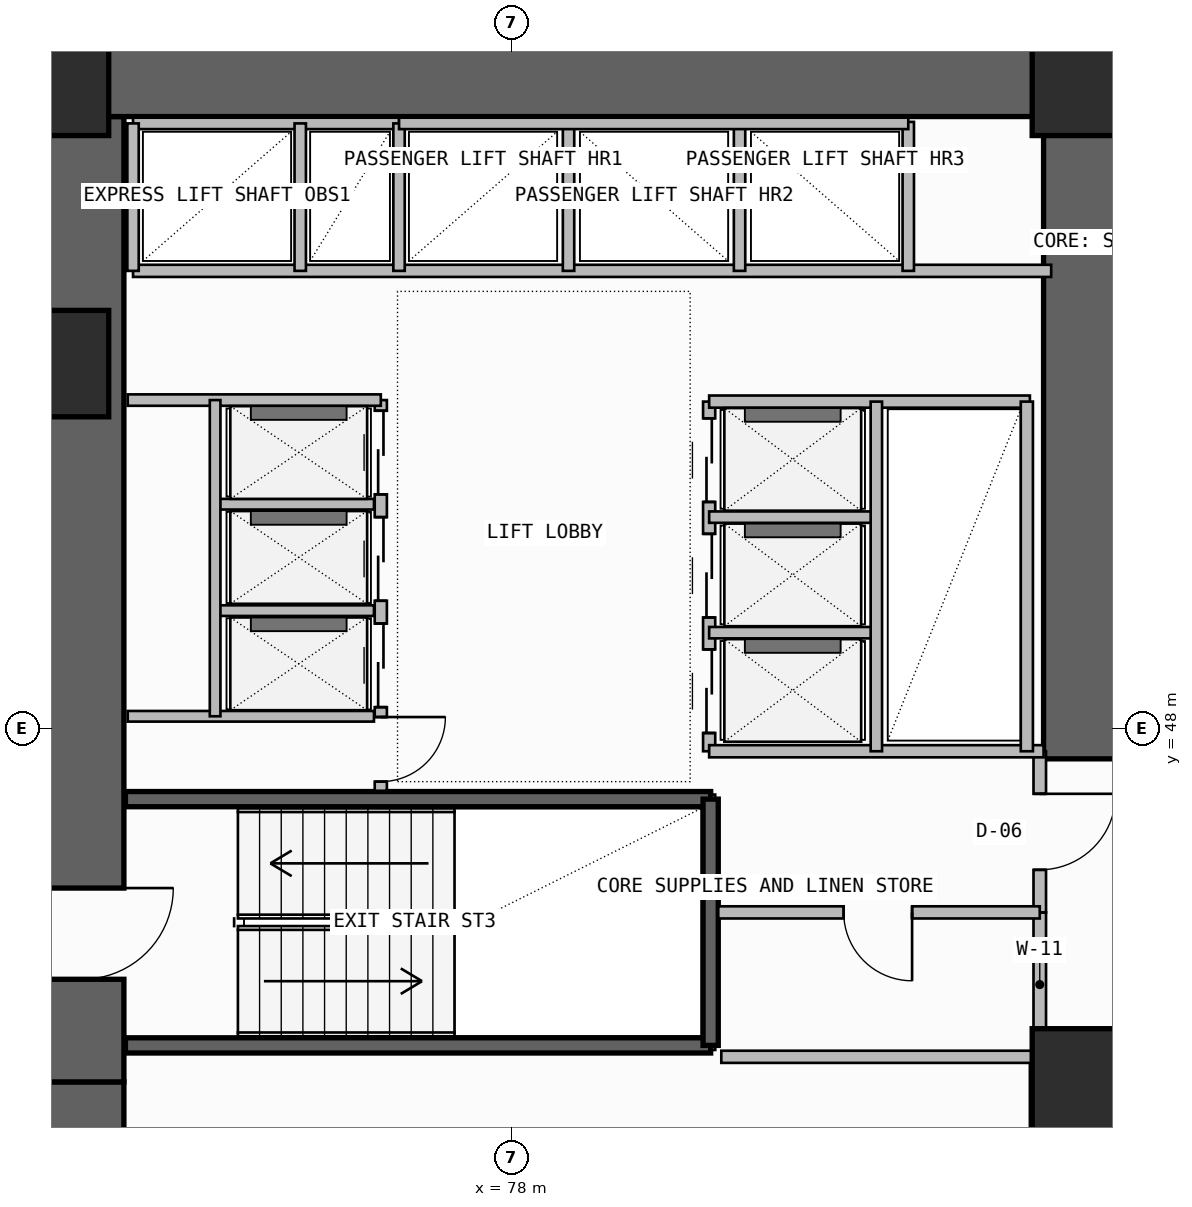
"""IFC4 building model, lengths in metres.
Left out: names, types, materials, properties, quantities, classifications, styles, units other than length and angle.
Written with IfcOpenShell. Run it as: python <this file> out.ifc"""

import sys

from ifc_helpers import new_model, si_unit, direction, frame, frame_2d, origin, origin_2d, place, context, subcontext, project, spatial, rectangle, extrude, element, fill, save


model = new_model("IFC4")
c1 = context("Model", 3, precision=1e-05, world=origin(), true_north=direction((0.0, 1.0)))
c2 = subcontext(c1, "Body", "Model", "MODEL_VIEW")
j1 = project(units=[si_unit("LENGTHUNIT", "METRE"), si_unit("PLANEANGLEUNIT", "RADIAN")], contexts=[c1])
p1 = place(None, origin())
s1 = spatial("IfcSite", under=j1, at=p1, CompositionType="ELEMENT")
p2 = place(p1, origin())
s2 = spatial("IfcBuilding", under=s1, at=p2, CompositionType="ELEMENT")
p3 = place(p2, frame((0.0, 0.0, 92.1)))
s3 = spatial("IfcBuildingStorey", under=s2, at=p3, CompositionType="ELEMENT", Elevation=92.1)
p4 = place(p3, frame((72.35, 35.5, -0.26), z_axis=(0.0, 0.0, 1.0), x_axis=(0.0, 1.0, 0.0)))
e1 = element("IfcWall", 1, at=p4, inside=s3, PredefinedType="SHEAR", context=c2, shape_type="SweptSolid", body=[
    extrude(rectangle(XDim=7.85, YDim=1.1, at=frame_2d((3.925, 0.0))), origin(), (0.0, 0.0, 1.0), 3.46),
])
p5 = place(p4, frame((1.45, 0.0, 0.26)))
e2 = element("IfcOpeningElement", 2, at=p5, cuts=e1, PredefinedType="OPENING", context=c2, shape_type="SweptSolid", body=[
    extrude(rectangle(XDim=1.2, YDim=2.2, at=frame_2d((0.6, 1.1))), frame((0.0, 0.56, 0.0), z_axis=(0.0, -1.0, 0.0), x_axis=(1.0, 0.0, 0.0)), (0.0, 0.0, 1.0), 1.12),
])
p6 = place(p3, frame((72.35, 43.35, -0.26), z_axis=(0.0, 0.0, 1.0), x_axis=(0.0, 1.0, 0.0)))
e3 = element("IfcWall", 3, at=p6, inside=s3, PredefinedType="SHEAR", context=c2, shape_type="SweptSolid", body=[
    extrude(rectangle(XDim=12.7, YDim=1.1, at=frame_2d((6.35, 0.0))), origin(), (0.0, 0.0, 1.0), 3.46),
])
p7 = place(p6, frame((1.35, 0.0, 0.26)))
e4 = element("IfcOpeningElement", 4, at=p7, cuts=e3, PredefinedType="OPENING", context=c2, shape_type="SweptSolid", body=[
    extrude(rectangle(XDim=1.2, YDim=2.2, at=frame_2d((0.6, 1.1))), frame((0.0, 0.56, 0.0), z_axis=(0.0, -1.0, 0.0), x_axis=(1.0, 0.0, 0.0)), (0.0, 0.0, 1.0), 1.12),
])
p8 = place(p3, frame((71.8, 56.6, -0.26), z_axis=(0.0, 0.0, 1.0), x_axis=(1.0, 0.0, 0.0)))
e5 = element("IfcWall", 5, at=p8, inside=s3, PredefinedType="SHEAR", context=c2, shape_type="SweptSolid", body=[
    extrude(rectangle(XDim=14.3, YDim=1.1, at=frame_2d((7.15, 0.0))), origin(), (0.0, 0.0, 1.0), 3.46),
])
p9 = place(p3, frame((85.55, 47.6, -0.26), z_axis=(0.0, 0.0, 1.0), x_axis=(0.0, 1.0, 0.0)))
e6 = element("IfcWall", 6, at=p9, inside=s3, PredefinedType="SHEAR", context=c2, shape_type="SweptSolid", body=[
    extrude(rectangle(XDim=8.45, YDim=1.1, at=frame_2d((4.225, 0.0))), origin(), (0.0, 0.0, 1.0), 3.46),
])
for number, where, z_axis, x_axis in (
    (7, (85.55, 43.35, 0.0), (0.0, 0.0, 1.0), (1.0, 0.0, 0.0)),
    (8, (72.0, 52.8, 0.0), (0.0, 0.0, 1.0), (1.0, 0.0, 0.0)),
    (9, (72.0, 56.5, 0.0), (0.0, 0.0, 1.0), (1.0, 0.0, 0.0)),
    (10, (85.55, 56.5, 0.0), (0.0, 0.0, 1.0), (1.0, 0.0, 0.0)),
):
    element("IfcColumn", number, at=place(p3, frame(where, z_axis=z_axis, x_axis=x_axis)), inside=s3, PredefinedType="COLUMN", context=c2, shape_type="SweptSolid", body=[
        extrude(rectangle(XDim=1.4, YDim=1.4, at=origin_2d()), origin(), (0.0, 0.0, 1.0), 3.6),
    ])
p10 = place(p3, frame((84.92, 38.85, 0.0), z_axis=(0.0, 0.0, 1.0), x_axis=(0.0, 1.0, 0.0)))
e11 = element("IfcWall", 11, at=p10, inside=s3, PredefinedType="SOLIDWALL", context=c2, shape_type="SweptSolid", body=[
    extrude(rectangle(XDim=4.83, YDim=0.2, at=frame_2d((2.415, 0.0))), origin(), (0.0, 0.0, 1.0), 3.2),
])
p11 = place(p10, frame((1.25, 0.0, 0.0)))
e12 = element("IfcOpeningElement", 12, at=p11, cuts=e11, PredefinedType="OPENING", context=c2, shape_type="SweptSolid", body=[
    extrude(rectangle(XDim=1.1, YDim=2.2, at=frame_2d((0.55, 1.1))), frame((0.0, 0.11, 0.0), z_axis=(0.0, -1.0, 0.0), x_axis=(1.0, 0.0, 0.0)), (0.0, 0.0, 1.0), 0.22),
])
for number, where, z_axis, x_axis in (
    (13, (72.92, 43.83, -0.26), (0.0, 0.0, 1.0), (1.0, 0.0, 0.0)),
    (14, (72.92, 47.07, -0.26), (0.0, 0.0, 1.0), (1.0, 0.0, 0.0)),
):
    element("IfcWall", number, at=place(p3, frame(where, z_axis=z_axis, x_axis=x_axis)), inside=s3, PredefinedType="SOLIDWALL", context=c2, shape_type="SweptSolid", body=[
        extrude(rectangle(XDim=7.7, YDim=0.2, at=frame_2d((3.85, 0.0))), origin(), (0.0, 0.0, 1.0), 3.46),
    ])
p12 = place(p3, frame((80.62, 43.83, -0.26), z_axis=(0.0, 0.0, 1.0), x_axis=(0.0, 1.0, 0.0)))
e15 = element("IfcWall", 15, at=p12, inside=s3, PredefinedType="SOLIDWALL", context=c2, shape_type="SweptSolid", body=[
    extrude(rectangle(XDim=3.24, YDim=0.2, at=frame_2d((1.62, 0.0))), origin(), (0.0, 0.0, 1.0), 3.46),
])
p13 = place(p3, frame((84.95, 43.68, 0.0), z_axis=(0.0, 0.0, 1.0), x_axis=(0.0, 1.0, 0.0)))
e16 = element("IfcWall", 16, at=p13, inside=s3, PredefinedType="PLUMBINGWALL", context=c2, shape_type="SweptSolid", body=[
    extrude(rectangle(XDim=1.9, YDim=0.165, at=frame_2d((0.95, 0.0))), origin(), (0.0, 0.0, 1.0), 3.2),
])
p14 = place(p3, frame((84.95, 45.58, 0.0), z_axis=(0.0, 0.0, 1.0), x_axis=(0.0, 1.0, 0.0)))
e17 = element("IfcWall", 17, at=p14, inside=s3, PredefinedType="PARTITIONING", context=c2, shape_type="SweptSolid", body=[
    extrude(rectangle(XDim=2.12, YDim=0.165, at=frame_2d((1.06, 0.0))), origin(), (0.0, 0.0, 1.0), 3.2),
])
p15 = place(p14, frame((0.56, 0.0, 0.0)))
e18 = element("IfcOpeningElement", 18, at=p15, cuts=e17, PredefinedType="OPENING", context=c2, shape_type="SweptSolid", body=[
    extrude(rectangle(XDim=1.0, YDim=2.2, at=frame_2d((0.5, 1.1))), frame((0.0, 0.093, 0.0), z_axis=(0.0, -1.0, 0.0), x_axis=(1.0, 0.0, 0.0)), (0.0, 0.0, 1.0), 0.185),
])
p16 = place(p3, frame((80.72, 45.58, 0.0), z_axis=(0.0, 0.0, 1.0), x_axis=(1.0, 0.0, 0.0)))
e19 = element("IfcWall", 19, at=p16, inside=s3, PredefinedType="PLUMBINGWALL", context=c2, shape_type="SweptSolid", body=[
    extrude(rectangle(XDim=4.23, YDim=0.16, at=frame_2d((2.115, 0.0))), origin(), (0.0, 0.0, 1.0), 3.2),
])
p17 = place(p16, frame((1.65, 0.0, 0.0)))
e20 = element("IfcOpeningElement", 20, at=p17, cuts=e19, PredefinedType="OPENING", context=c2, shape_type="SweptSolid", body=[
    extrude(rectangle(XDim=0.9, YDim=2.1, at=frame_2d((0.45, 1.05))), frame((0.0, 0.09, 0.0), z_axis=(0.0, -1.0, 0.0), x_axis=(1.0, 0.0, 0.0)), (0.0, 0.0, 1.0), 0.18),
])
p18 = place(p3, frame((80.76, 43.68, 0.0), z_axis=(0.0, 0.0, 1.0), x_axis=(1.0, 0.0, 0.0)))
e21 = element("IfcWall", 21, at=p18, inside=s3, PredefinedType="PLUMBINGWALL", context=c2, shape_type="SweptSolid", body=[
    extrude(rectangle(XDim=4.19, YDim=0.16, at=frame_2d((2.095, 0.0))), origin(), (0.0, 0.0, 1.0), 3.2),
])
p19 = place(p3, frame((76.28, 47.18, 0.0), z_axis=(0.0, 0.0, 1.0), x_axis=(0.0, 1.0, 0.0)))
e22 = element("IfcWall", 22, at=p19, inside=s3, PredefinedType="SOLIDWALL", context=c2, shape_type="SweptSolid", body=[
    extrude(rectangle(XDim=5.14, YDim=0.16, at=frame_2d((2.57, 0.0))), origin(), (0.0, 0.0, 1.0), 3.2),
])
p20 = place(p19, frame((1.1, 0.0, 0.0)))
e23 = element("IfcOpeningElement", 23, at=p20, cuts=e22, PredefinedType="OPENING", context=c2, shape_type="SweptSolid", body=[
    extrude(rectangle(XDim=1.1, YDim=2.25, at=frame_2d((0.55, 1.125))), frame((0.0, 0.09, 0.0), z_axis=(0.0, -1.0, 0.0), x_axis=(1.0, 0.0, 0.0)), (0.0, 0.0, 1.0), 0.18),
])
p21 = place(p19, frame((2.5, 0.0, 0.0)))
e24 = element("IfcOpeningElement", 24, at=p21, cuts=e22, PredefinedType="OPENING", context=c2, shape_type="SweptSolid", body=[
    extrude(rectangle(XDim=1.1, YDim=2.25, at=frame_2d((0.55, 1.125))), frame((0.0, 0.09, 0.0), z_axis=(0.0, -1.0, 0.0), x_axis=(1.0, 0.0, 0.0)), (0.0, 0.0, 1.0), 0.18),
])
p22 = place(p19, frame((3.9, 0.0, 0.0)))
e25 = element("IfcOpeningElement", 25, at=p22, cuts=e22, PredefinedType="OPENING", context=c2, shape_type="SweptSolid", body=[
    extrude(rectangle(XDim=1.1, YDim=2.25, at=frame_2d((0.55, 1.125))), frame((0.0, 0.09, 0.0), z_axis=(0.0, -1.0, 0.0), x_axis=(1.0, 0.0, 0.0)), (0.0, 0.0, 1.0), 0.18),
])
p23 = place(p19, frame((0.12, 0.0, 0.0)))
e26 = element("IfcOpeningElement", 26, at=p23, cuts=e22, PredefinedType="OPENING", context=c2, shape_type="SweptSolid", body=[
    extrude(rectangle(XDim=0.85, YDim=2.05, at=frame_2d((0.425, 1.025))), frame((0.0, 0.09, 0.0), z_axis=(0.0, -1.0, 0.0), x_axis=(1.0, 0.0, 0.0)), (0.0, 0.0, 1.0), 0.18),
])
p24 = place(p3, frame((72.95, 52.32, 0.0), z_axis=(0.0, 0.0, 1.0), x_axis=(1.0, 0.0, 0.0)))
e27 = element("IfcWall", 27, at=p24, inside=s3, PredefinedType="SOLIDWALL", context=c2, shape_type="SweptSolid", body=[
    extrude(rectangle(XDim=3.33, YDim=0.15, at=frame_2d((1.665, 0.0))), origin(), (0.0, 0.0, 1.0), 3.2),
])
p25 = place(p3, frame((72.95, 48.16, 0.0), z_axis=(0.0, 0.0, 1.0), x_axis=(1.0, 0.0, 0.0)))
e28 = element("IfcWall", 28, at=p25, inside=s3, PredefinedType="PLUMBINGWALL", context=c2, shape_type="SweptSolid", body=[
    extrude(rectangle(XDim=3.24, YDim=0.14, at=frame_2d((1.62, 0.0))), origin(), (0.0, 0.0, 1.0), 3.2),
])
for number, where, z_axis, x_axis in (
    (29, (74.15, 49.55, 0.0), (0.0, 0.0, 1.0), (1.0, 0.0, 0.0)),
    (30, (74.15, 50.95, 0.0), (0.0, 0.0, 1.0), (1.0, 0.0, 0.0)),
):
    element("IfcWall", number, at=place(p3, frame(where, z_axis=z_axis, x_axis=x_axis)), inside=s3, PredefinedType="PLUMBINGWALL", context=c2, shape_type="SweptSolid", body=[
        extrude(rectangle(XDim=2.04, YDim=0.14, at=frame_2d((1.02, 0.0))), origin(), (0.0, 0.0, 1.0), 3.2),
    ])
p26 = place(p3, frame((74.1, 48.16, 0.0), z_axis=(0.0, 0.0, 1.0), x_axis=(0.0, 1.0, 0.0)))
e31 = element("IfcWall", 31, at=p26, inside=s3, PredefinedType="PLUMBINGWALL", context=c2, shape_type="SweptSolid", body=[
    extrude(rectangle(XDim=4.16, YDim=0.14, at=frame_2d((2.08, 0.0))), origin(), (0.0, 0.0, 1.0), 3.2),
])
p27 = place(p3, frame((80.6, 47.7, 0.0), z_axis=(0.0, 0.0, 1.0), x_axis=(0.0, 1.0, 0.0)))
e32 = element("IfcWall", 32, at=p27, inside=s3, PredefinedType="SOLIDWALL", context=c2, shape_type="SweptSolid", body=[
    extrude(rectangle(XDim=4.6, YDim=0.16, at=frame_2d((2.3, 0.0))), origin(), (0.0, 0.0, 1.0), 3.2),
])
p28 = place(p27, frame((0.24, 0.0, 0.0)))
e33 = element("IfcOpeningElement", 33, at=p28, cuts=e32, PredefinedType="OPENING", context=c2, shape_type="SweptSolid", body=[
    extrude(rectangle(XDim=1.1, YDim=2.25, at=frame_2d((0.55, 1.125))), frame((0.0, 0.09, 0.0), z_axis=(0.0, -1.0, 0.0), x_axis=(1.0, 0.0, 0.0)), (0.0, 0.0, 1.0), 0.18),
])
p29 = place(p27, frame((1.76, 0.0, 0.0)))
e34 = element("IfcOpeningElement", 34, at=p29, cuts=e32, PredefinedType="OPENING", context=c2, shape_type="SweptSolid", body=[
    extrude(rectangle(XDim=1.1, YDim=2.25, at=frame_2d((0.55, 1.125))), frame((0.0, 0.09, 0.0), z_axis=(0.0, -1.0, 0.0), x_axis=(1.0, 0.0, 0.0)), (0.0, 0.0, 1.0), 0.18),
])
p30 = place(p27, frame((3.28, 0.0, 0.0)))
e35 = element("IfcOpeningElement", 35, at=p30, cuts=e32, PredefinedType="OPENING", context=c2, shape_type="SweptSolid", body=[
    extrude(rectangle(XDim=1.1, YDim=2.25, at=frame_2d((0.55, 1.125))), frame((0.0, 0.09, 0.0), z_axis=(0.0, -1.0, 0.0), x_axis=(1.0, 0.0, 0.0)), (0.0, 0.0, 1.0), 0.18),
])
p31 = place(p3, frame((80.6, 47.7, 0.0), z_axis=(0.0, 0.0, 1.0), x_axis=(1.0, 0.0, 0.0)))
e36 = element("IfcWall", 36, at=p31, inside=s3, PredefinedType="SOLIDWALL", context=c2, shape_type="SweptSolid", body=[
    extrude(rectangle(XDim=4.4, YDim=0.16, at=frame_2d((2.2, 0.0))), origin(), (0.0, 0.0, 1.0), 3.2),
])
p32 = place(p3, frame((80.6, 52.3, 0.0), z_axis=(0.0, 0.0, 1.0), x_axis=(1.0, 0.0, 0.0)))
e37 = element("IfcWall", 37, at=p32, inside=s3, PredefinedType="SOLIDWALL", context=c2, shape_type="SweptSolid", body=[
    extrude(rectangle(XDim=4.22, YDim=0.16, at=frame_2d((2.11, 0.0))), origin(), (0.0, 0.0, 1.0), 3.2),
])
for number, where, z_axis, x_axis in (
    (38, (80.6, 49.26, 0.0), (0.0, 0.0, 1.0), (1.0, 0.0, 0.0)),
    (39, (80.6, 50.78, 0.0), (0.0, 0.0, 1.0), (1.0, 0.0, 0.0)),
):
    element("IfcWall", number, at=place(p3, frame(where, z_axis=z_axis, x_axis=x_axis)), inside=s3, PredefinedType="PLUMBINGWALL", context=c2, shape_type="SweptSolid", body=[
        extrude(rectangle(XDim=2.2, YDim=0.15, at=frame_2d((1.1, 0.0))), origin(), (0.0, 0.0, 1.0), 3.2),
    ])
p33 = place(p3, frame((82.8, 47.7, 0.0), z_axis=(0.0, 0.0, 1.0), x_axis=(0.0, 1.0, 0.0)))
e40 = element("IfcWall", 40, at=p33, inside=s3, PredefinedType="PLUMBINGWALL", context=c2, shape_type="SweptSolid", body=[
    extrude(rectangle(XDim=4.6, YDim=0.15, at=frame_2d((2.3, 0.0))), origin(), (0.0, 0.0, 1.0), 3.2),
])
p34 = place(p3, frame((84.78, 47.7, 0.0), z_axis=(0.0, 0.0, 1.0), x_axis=(0.0, 1.0, 0.0)))
e41 = element("IfcWall", 41, at=p34, inside=s3, PredefinedType="SOLIDWALL", context=c2, shape_type="SweptSolid", body=[
    extrude(rectangle(XDim=4.6, YDim=0.16, at=frame_2d((2.3, 0.0))), origin(), (0.0, 0.0, 1.0), 3.2),
])
p35 = place(p3, frame((73.02, 54.02, 0.0), z_axis=(0.0, 0.0, 1.0), x_axis=(1.0, 0.0, 0.0)))
e42 = element("IfcWall", 42, at=p35, inside=s3, PredefinedType="SOLIDWALL", context=c2, shape_type="SweptSolid", body=[
    extrude(rectangle(XDim=12.08, YDim=0.16, at=frame_2d((6.04, 0.0))), origin(), (0.0, 0.0, 1.0), 3.2),
])
p36 = place(p3, frame((73.02, 55.96, 0.0), z_axis=(0.0, 0.0, 1.0), x_axis=(1.0, 0.0, 0.0)))
e43 = element("IfcWall", 43, at=p36, inside=s3, PredefinedType="SOLIDWALL", context=c2, shape_type="SweptSolid", body=[
    extrude(rectangle(XDim=3.5, YDim=0.15, at=frame_2d((1.75, 0.0))), origin(), (0.0, 0.0, 1.0), 3.2),
])
p37 = place(p3, frame((73.02, 54.02, 0.0), z_axis=(0.0, 0.0, 1.0), x_axis=(0.0, 1.0, 0.0)))
e44 = element("IfcWall", 44, at=p37, inside=s3, PredefinedType="PLUMBINGWALL", context=c2, shape_type="SweptSolid", body=[
    extrude(rectangle(XDim=1.94, YDim=0.15, at=frame_2d((0.97, 0.0))), origin(), (0.0, 0.0, 1.0), 3.2),
])
p38 = place(p3, frame((76.52, 54.02, 0.0), z_axis=(0.0, 0.0, 1.0), x_axis=(0.0, 1.0, 0.0)))
e45 = element("IfcWall", 45, at=p38, inside=s3, PredefinedType="SOLIDWALL", context=c2, shape_type="SweptSolid", body=[
    extrude(rectangle(XDim=1.94, YDim=0.15, at=frame_2d((0.97, 0.0))), origin(), (0.0, 0.0, 1.0), 3.2),
])
p39 = place(p3, frame((75.22, 54.02, 0.0), z_axis=(0.0, 0.0, 1.0), x_axis=(0.0, 1.0, 0.0)))
e46 = element("IfcWall", 46, at=p39, inside=s3, PredefinedType="PLUMBINGWALL", context=c2, shape_type="SweptSolid", body=[
    extrude(rectangle(XDim=1.94, YDim=0.15, at=frame_2d((0.97, 0.0))), origin(), (0.0, 0.0, 1.0), 3.2),
])
for number, where, z_axis, x_axis in (
    (47, (78.75, 54.02, 0.0), (0.0, 0.0, 1.0), (0.0, 1.0, 0.0)),
    (48, (81.0, 54.02, 0.0), (0.0, 0.0, 1.0), (0.0, 1.0, 0.0)),
):
    element("IfcWall", number, at=place(p3, frame(where, z_axis=z_axis, x_axis=x_axis)), inside=s3, PredefinedType="PLUMBINGWALL", context=c2, shape_type="SweptSolid", body=[
        extrude(rectangle(XDim=1.96, YDim=0.15, at=frame_2d((0.98, 0.0))), origin(), (0.0, 0.0, 1.0), 3.2),
    ])
p40 = place(p3, frame((83.22, 54.02, 0.0), z_axis=(0.0, 0.0, 1.0), x_axis=(0.0, 1.0, 0.0)))
e49 = element("IfcWall", 49, at=p40, inside=s3, PredefinedType="SOLIDWALL", context=c2, shape_type="SweptSolid", body=[
    extrude(rectangle(XDim=1.96, YDim=0.15, at=frame_2d((0.98, 0.0))), origin(), (0.0, 0.0, 1.0), 3.2),
])
p41 = place(p3, frame((76.52, 55.96, 0.0), z_axis=(0.0, 0.0, 1.0), x_axis=(1.0, 0.0, 0.0)))
e50 = element("IfcWall", 50, at=p41, inside=s3, PredefinedType="SOLIDWALL", context=c2, shape_type="SweptSolid", body=[
    extrude(rectangle(XDim=6.7, YDim=0.15, at=frame_2d((3.35, 0.0))), origin(), (0.0, 0.0, 1.0), 3.2),
])
p42 = place(p7, frame((1.2, 0.0, 0.0), z_axis=(0.0, 0.0, 1.0), x_axis=(-1.0, 0.0, 0.0)))
e51 = element("IfcDoor", 51, at=p42, inside=s3, OperationType="SINGLE_SWING_LEFT", PredefinedType="USERDEFINED", context=c2, shape_type="SweptSolid", body=[
    extrude(rectangle(XDim=1.2, YDim=2.2, at=frame_2d((0.6, 1.1))), frame((0.0, 0.025, 0.0), z_axis=(0.0, -1.0, 0.0), x_axis=(1.0, 0.0, 0.0)), (0.0, 0.0, 1.0), 0.05),
])
fill(e4, e51)
p43 = place(p15, frame((1.0, 0.0, 0.0), z_axis=(0.0, 0.0, 1.0), x_axis=(-1.0, 0.0, 0.0)))
e52 = element("IfcDoor", 52, at=p43, inside=s3, OperationType="SINGLE_SWING_LEFT", PredefinedType="DOOR", context=c2, shape_type="SweptSolid", body=[
    extrude(rectangle(XDim=1.0, YDim=2.2, at=frame_2d((0.5, 1.1))), frame((0.0, 0.025, 0.0), z_axis=(0.0, -1.0, 0.0), x_axis=(1.0, 0.0, 0.0)), (0.0, 0.0, 1.0), 0.05),
])
fill(e18, e52)
p44 = place(p17, frame((0.9, 0.0, 0.0), z_axis=(0.0, 0.0, 1.0), x_axis=(-1.0, 0.0, 0.0)))
e53 = element("IfcDoor", 53, at=p44, inside=s3, OperationType="SINGLE_SWING_LEFT", PredefinedType="DOOR", context=c2, shape_type="SweptSolid", body=[
    extrude(rectangle(XDim=0.9, YDim=2.1, at=frame_2d((0.45, 1.05))), frame((0.0, 0.025, 0.0), z_axis=(0.0, -1.0, 0.0), x_axis=(1.0, 0.0, 0.0)), (0.0, 0.0, 1.0), 0.05),
])
fill(e20, e53)
p45 = place(p20, origin())
e54 = element("IfcDoor", 54, at=p45, inside=s3, OperationType="DOUBLE_DOOR_SLIDING", PredefinedType="DOOR", context=c2, shape_type="SweptSolid", body=[
    extrude(rectangle(XDim=1.1, YDim=2.25, at=frame_2d((0.55, 1.125))), frame((0.0, 0.025, 0.0), z_axis=(0.0, -1.0, 0.0), x_axis=(1.0, 0.0, 0.0)), (0.0, 0.0, 1.0), 0.05),
])
fill(e23, e54)
p46 = place(p21, origin())
e55 = element("IfcDoor", 55, at=p46, inside=s3, OperationType="DOUBLE_DOOR_SLIDING", PredefinedType="DOOR", context=c2, shape_type="SweptSolid", body=[
    extrude(rectangle(XDim=1.1, YDim=2.25, at=frame_2d((0.55, 1.125))), frame((0.0, 0.025, 0.0), z_axis=(0.0, -1.0, 0.0), x_axis=(1.0, 0.0, 0.0)), (0.0, 0.0, 1.0), 0.05),
])
fill(e24, e55)
p47 = place(p22, origin())
e56 = element("IfcDoor", 56, at=p47, inside=s3, OperationType="DOUBLE_DOOR_SLIDING", PredefinedType="DOOR", context=c2, shape_type="SweptSolid", body=[
    extrude(rectangle(XDim=1.1, YDim=2.25, at=frame_2d((0.55, 1.125))), frame((0.0, 0.025, 0.0), z_axis=(0.0, -1.0, 0.0), x_axis=(1.0, 0.0, 0.0)), (0.0, 0.0, 1.0), 0.05),
])
fill(e25, e56)
p48 = place(p23, frame((0.85, 0.0, 0.0), z_axis=(0.0, 0.0, 1.0), x_axis=(-1.0, 0.0, 0.0)))
e57 = element("IfcDoor", 57, at=p48, inside=s3, OperationType="SINGLE_SWING_LEFT", PredefinedType="DOOR", context=c2, shape_type="SweptSolid", body=[
    extrude(rectangle(XDim=0.85, YDim=2.05, at=frame_2d((0.425, 1.025))), frame((0.0, 0.025, 0.0), z_axis=(0.0, -1.0, 0.0), x_axis=(1.0, 0.0, 0.0)), (0.0, 0.0, 1.0), 0.05),
])
fill(e26, e57)
p49 = place(p28, frame((1.1, 0.0, 0.0), z_axis=(0.0, 0.0, 1.0), x_axis=(-1.0, 0.0, 0.0)))
e58 = element("IfcDoor", 58, at=p49, inside=s3, OperationType="DOUBLE_DOOR_SLIDING", PredefinedType="DOOR", context=c2, shape_type="SweptSolid", body=[
    extrude(rectangle(XDim=1.1, YDim=2.25, at=frame_2d((0.55, 1.125))), frame((0.0, 0.025, 0.0), z_axis=(0.0, -1.0, 0.0), x_axis=(1.0, 0.0, 0.0)), (0.0, 0.0, 1.0), 0.05),
])
fill(e33, e58)
p50 = place(p29, frame((1.1, 0.0, 0.0), z_axis=(0.0, 0.0, 1.0), x_axis=(-1.0, 0.0, 0.0)))
e59 = element("IfcDoor", 59, at=p50, inside=s3, OperationType="DOUBLE_DOOR_SLIDING", PredefinedType="DOOR", context=c2, shape_type="SweptSolid", body=[
    extrude(rectangle(XDim=1.1, YDim=2.25, at=frame_2d((0.55, 1.125))), frame((0.0, 0.025, 0.0), z_axis=(0.0, -1.0, 0.0), x_axis=(1.0, 0.0, 0.0)), (0.0, 0.0, 1.0), 0.05),
])
fill(e34, e59)
p51 = place(p30, frame((1.1, 0.0, 0.0), z_axis=(0.0, 0.0, 1.0), x_axis=(-1.0, 0.0, 0.0)))
e60 = element("IfcDoor", 60, at=p51, inside=s3, OperationType="DOUBLE_DOOR_SLIDING", PredefinedType="DOOR", context=c2, shape_type="SweptSolid", body=[
    extrude(rectangle(XDim=1.1, YDim=2.25, at=frame_2d((0.55, 1.125))), frame((0.0, 0.025, 0.0), z_axis=(0.0, -1.0, 0.0), x_axis=(1.0, 0.0, 0.0)), (0.0, 0.0, 1.0), 0.05),
])
fill(e35, e60)
save(model, sys.argv[1])
